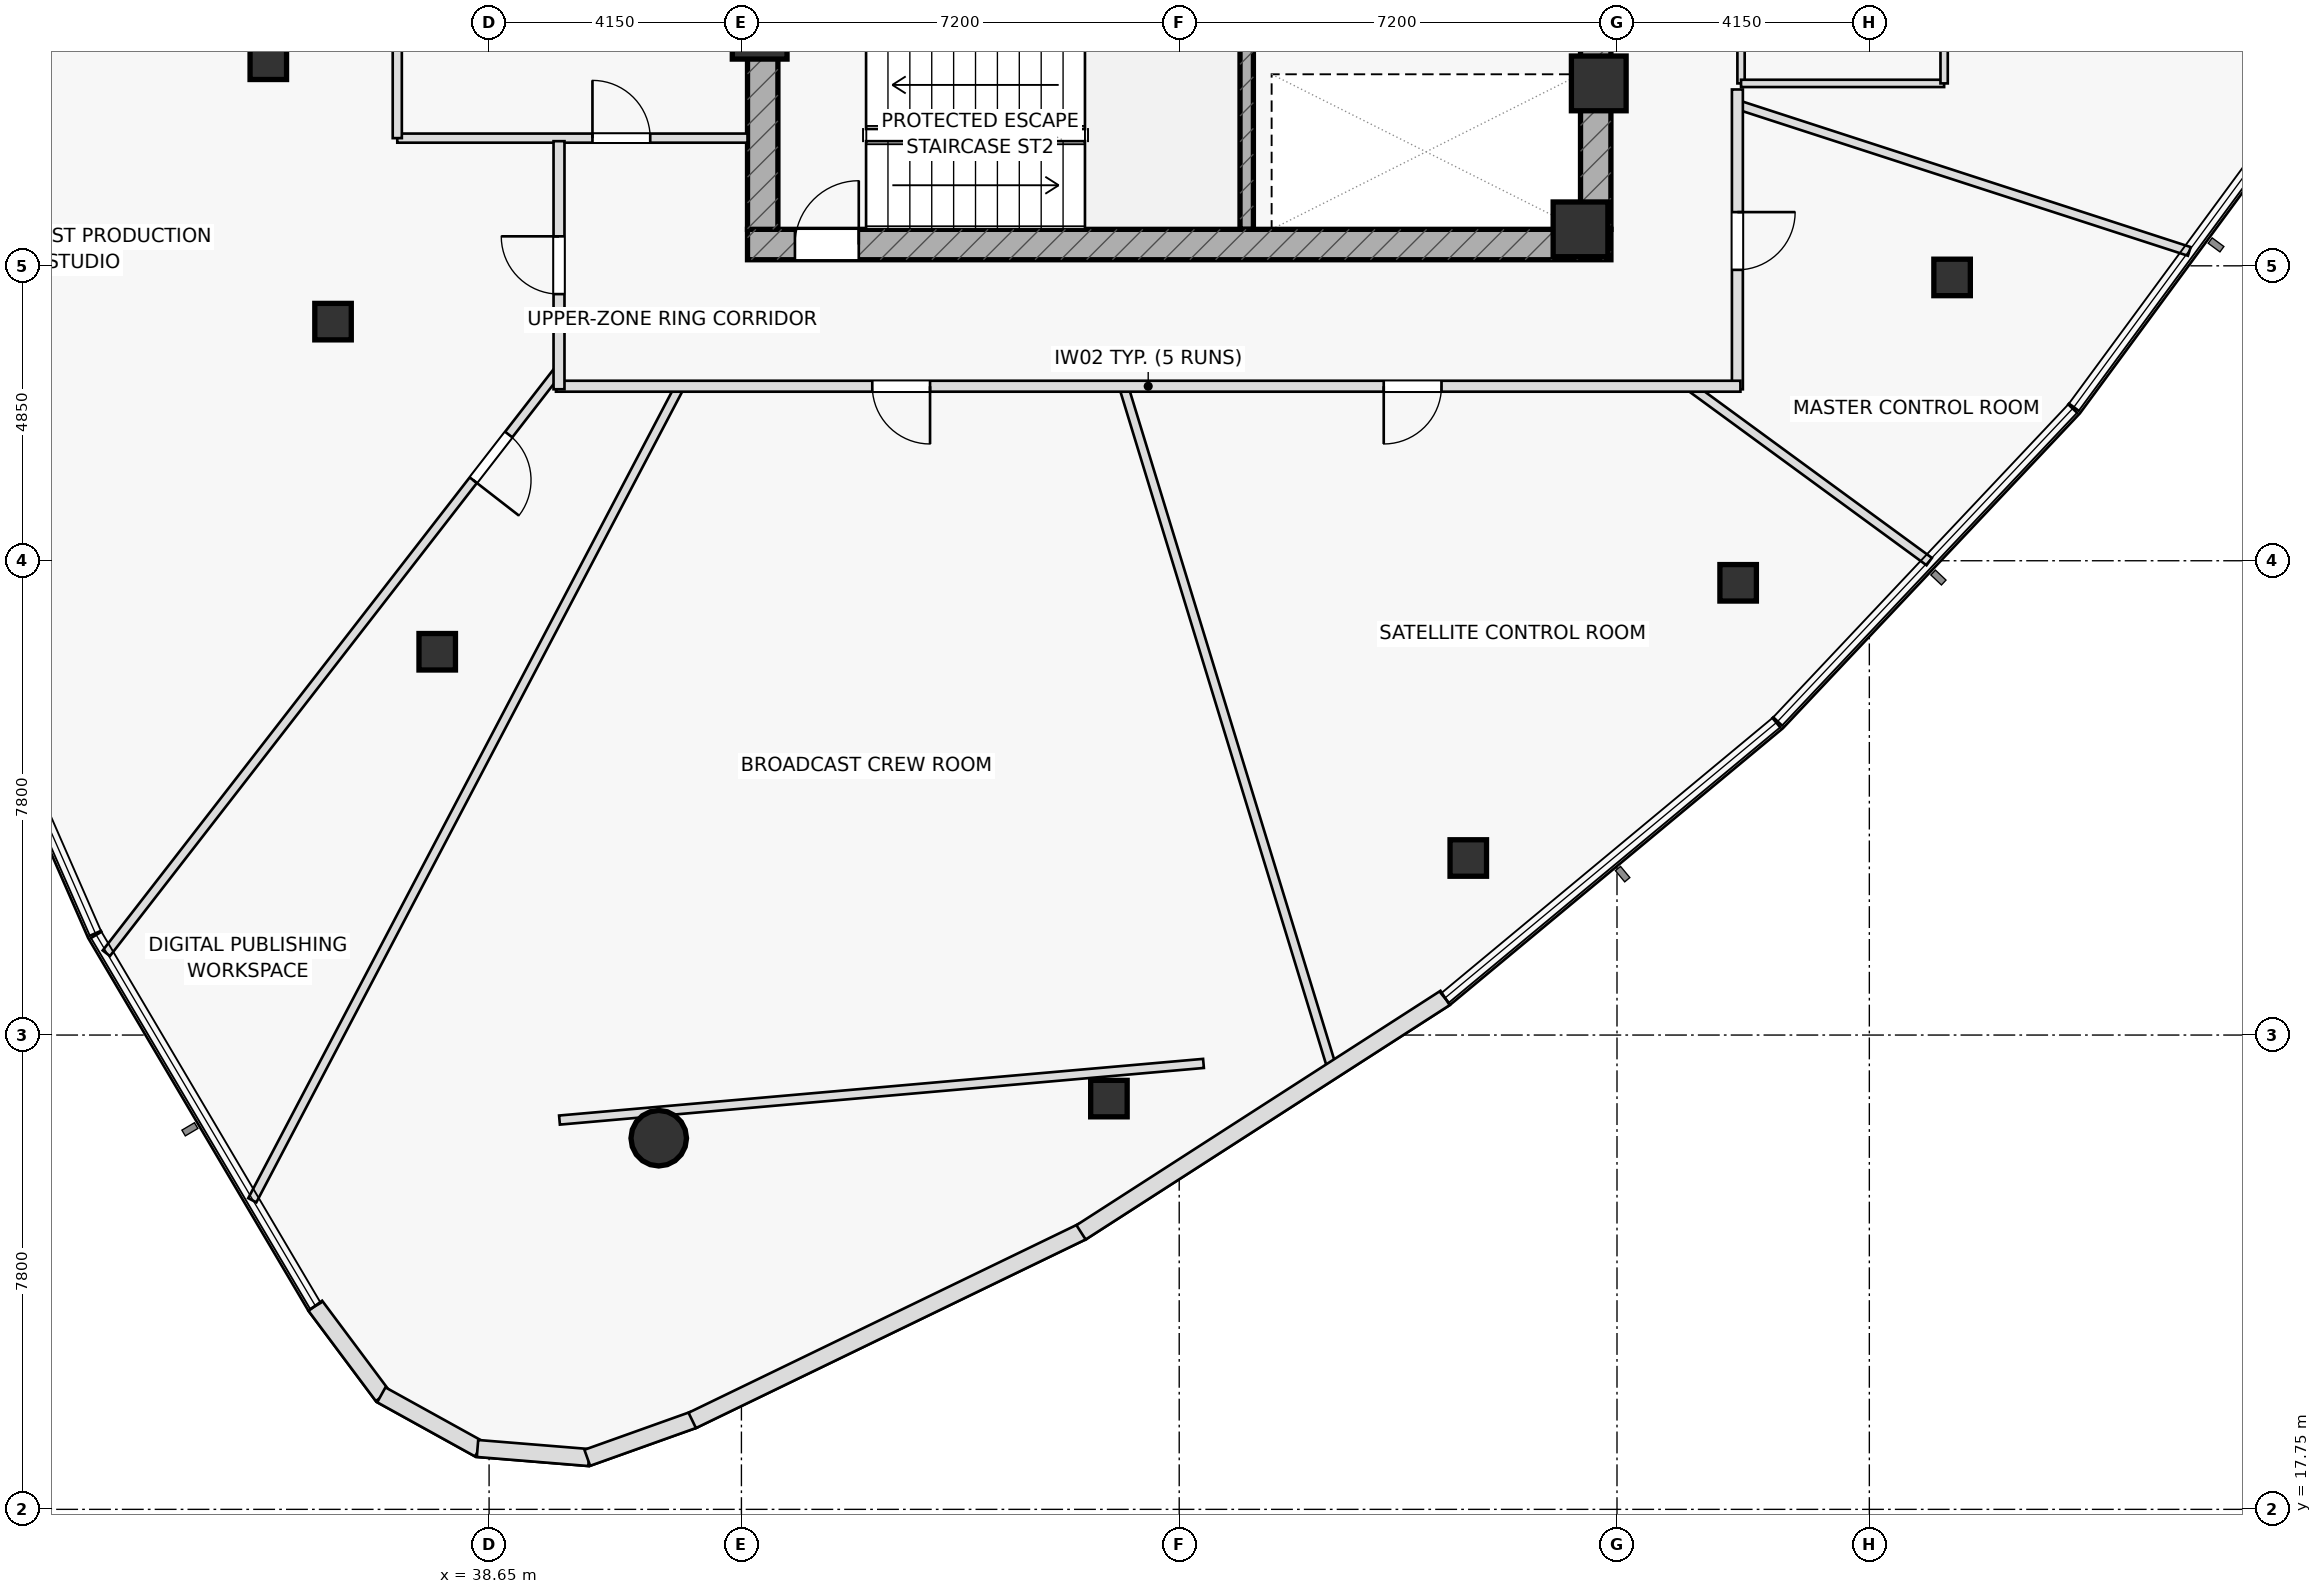
"""IFC4 building model, lengths in metres.
Left out: names, types, materials, properties, quantities, classifications, styles, units other than length and angle.
Written with IfcOpenShell. Run it as: python <this file> out.ifc"""

import sys

from ifc_helpers import new_model, si_unit, direction, frame, frame_2d, origin, origin_2d, place, context, subcontext, project, spatial, rectangle, hollow_rectangle, hollow_circle, extrude, element, fill, save


model = new_model("IFC4")
c1 = context("Model", 3, precision=1e-05, world=origin(), true_north=direction((0.0, 1.0)))
c2 = subcontext(c1, "Body", "Model", "MODEL_VIEW")
j1 = project(units=[si_unit("LENGTHUNIT", "METRE"), si_unit("PLANEANGLEUNIT", "RADIAN")], contexts=[c1])
p1 = place(None, origin())
s1 = spatial("IfcSite", under=j1, at=p1, CompositionType="ELEMENT")
p2 = place(p1, origin())
s2 = spatial("IfcBuilding", under=s1, at=p2, CompositionType="ELEMENT")
p3 = place(p2, frame((0.0, 0.0, 222.15)))
s3 = spatial("IfcBuildingStorey", under=s2, at=p3, CompositionType="ELEMENT", Elevation=222.15)
p4 = place(p3, frame((51.11, 38.8, 0.0), z_axis=(0.0, 0.0, 1.0), x_axis=(0.0, 1.0, 0.0)))
e1 = element("IfcWall", 1, at=p4, inside=s3, PredefinedType="SHEAR", context=c2, shape_type="SweptSolid", body=[
    extrude(rectangle(XDim=3.1, YDim=0.22, at=frame_2d((1.55, 0.0))), origin(), (0.0, 0.0, 1.0), 3.65),
])
p5 = place(p3, frame((42.9, 38.55, 0.0), z_axis=(0.0, 0.0, 1.0), x_axis=(1.0, 0.0, 0.0)))
e2 = element("IfcWall", 2, at=p5, inside=s3, PredefinedType="SHEAR", context=c2, shape_type="SweptSolid", body=[
    extrude(rectangle(XDim=14.2, YDim=0.5, at=frame_2d((7.1, 0.0))), origin(), (0.0, 0.0, 1.0), 3.65),
])
p6 = place(p5, frame((0.78, 0.0, 0.0)))
e3 = element("IfcOpeningElement", 3, at=p6, cuts=e2, PredefinedType="OPENING", context=c2, shape_type="SweptSolid", body=[
    extrude(rectangle(XDim=1.05, YDim=2.2, at=frame_2d((0.525, 1.1))), frame((0.0, 0.26, 0.0), z_axis=(0.0, -1.0, 0.0), x_axis=(1.0, 0.0, 0.0)), (0.0, 0.0, 1.0), 0.52),
])
p7 = place(p3, frame((43.15, 38.8, 0.0), z_axis=(0.0, 0.0, 1.0), x_axis=(0.0, 1.0, 0.0)))
e4 = element("IfcWall", 4, at=p7, inside=s3, PredefinedType="SHEAR", context=c2, shape_type="SweptSolid", body=[
    extrude(rectangle(XDim=12.4, YDim=0.5, at=frame_2d((6.2, 0.0))), origin(), (0.0, 0.0, 1.0), 3.65),
])
p8 = place(p3, frame((56.85, 38.8, 0.0), z_axis=(0.0, 0.0, 1.0), x_axis=(0.0, 1.0, 0.0)))
e5 = element("IfcWall", 5, at=p8, inside=s3, PredefinedType="SHEAR", context=c2, shape_type="SweptSolid", body=[
    extrude(rectangle(XDim=12.4, YDim=0.5, at=frame_2d((6.2, 0.0))), origin(), (0.0, 0.0, 1.0), 3.65),
])
p9 = place(p8, frame((3.85, 0.0, 0.0)))
e6 = element("IfcOpeningElement", 6, at=p9, cuts=e5, PredefinedType="OPENING", context=c2, shape_type="SweptSolid", body=[
    extrude(rectangle(XDim=1.5, YDim=2.2, at=frame_2d((0.75, 1.1))), frame((0.0, 0.26, 0.0), z_axis=(0.0, -1.0, 0.0), x_axis=(1.0, 0.0, 0.0)), (0.0, 0.0, 1.0), 0.52),
])
for number, where, z_axis, x_axis in (
    (7, (43.1, 42.05, 0.0), (0.0, 0.0, 1.0), (1.0, 0.0, 0.0)),
    (8, (56.9, 41.2, 0.0), (0.0, 0.0, 1.0), (1.0, 0.0, 0.0)),
    (9, (56.6, 38.8, 0.0), (0.0, 0.0, 1.0), (1.0, 0.0, 0.0)),
):
    element("IfcColumn", number, at=place(p3, frame(where, z_axis=z_axis, x_axis=x_axis)), inside=s3, PredefinedType="COLUMN", context=c2, shape_type="SweptSolid", body=[
        extrude(rectangle(XDim=0.9, YDim=0.9, at=origin_2d()), origin(), (0.0, 0.0, 1.0), 3.65),
    ])
for number, where, z_axis, x_axis in (
    (10, (35.019, 41.564, 0.0), (0.0, 0.0, 1.0), (1.0, 0.0, 0.0)),
    (11, (36.083, 37.282, 0.0), (0.0, 0.0, 1.0), (1.0, 0.0, 0.0)),
    (12, (37.797, 31.853, 0.0), (0.0, 0.0, 1.0), (1.0, 0.0, 0.0)),
):
    element("IfcColumn", number, at=place(p3, frame(where, z_axis=z_axis, x_axis=x_axis)), inside=s3, PredefinedType="COLUMN", context=c2, shape_type="SweptSolid", body=[
        extrude(hollow_rectangle(XDim=0.6, YDim=0.6, WallThickness=0.036, at=origin_2d()), origin(), (0.0, 0.0, 1.0), 3.65),
    ])
p10 = place(p3, frame((41.44, 23.854, 0.0), z_axis=(0.0, 0.0, 1.0), x_axis=(1.0, 0.0, 0.0)))
e13 = element("IfcColumn", 13, at=p10, inside=s3, PredefinedType="COLUMN", context=c2, shape_type="SweptSolid", body=[
    extrude(hollow_circle(Radius=0.457, WallThickness=0.04, at=origin_2d()), origin(), (0.0, 0.0, 1.0), 3.65),
])
for number, where, z_axis, x_axis in (
    (14, (48.844, 24.505, 0.0), (0.0, 0.0, 1.0), (1.0, 0.0, 0.0)),
    (15, (54.754, 28.462, 0.0), (0.0, 0.0, 1.0), (1.0, 0.0, 0.0)),
    (16, (59.192, 32.987, 0.0), (0.0, 0.0, 1.0), (1.0, 0.0, 0.0)),
    (17, (62.711, 38.009, 0.0), (0.0, 0.0, 1.0), (1.0, 0.0, 0.0)),
):
    element("IfcColumn", number, at=place(p3, frame(where, z_axis=z_axis, x_axis=x_axis)), inside=s3, PredefinedType="COLUMN", context=c2, shape_type="SweptSolid", body=[
        extrude(hollow_rectangle(XDim=0.6, YDim=0.6, WallThickness=0.036, at=origin_2d()), origin(), (0.0, 0.0, 1.0), 3.65),
    ])
p11 = place(p3, frame((39.808, 24.152, 0.0), z_axis=(0.0, 0.0, 1.0), x_axis=(0.996153584085, 0.087624408208, 0.0)))
e18 = element("IfcWall", 18, at=p11, inside=s3, PredefinedType="PARTITIONING", context=c2, shape_type="SweptSolid", body=[
    extrude(rectangle(XDim=10.632, YDim=0.15, at=frame_2d((5.316, 0.0))), origin(), (0.0, 0.0, 1.0), 3.135),
])
p12 = place(p3, frame((37.14, 40.3, 0.0), z_axis=(0.0, 0.0, 1.0), x_axis=(1.0, 0.0, 0.0)))
e19 = element("IfcWall", 19, at=p12, inside=s3, PredefinedType="PARTITIONING", context=c2, shape_type="SweptSolid", body=[
    extrude(rectangle(XDim=5.76, YDim=0.15, at=frame_2d((2.88, 0.0))), origin(), (0.0, 0.0, 1.0), 3.025),
])
p13 = place(p12, frame((3.21, 0.0, 0.0)))
e20 = element("IfcOpeningElement", 20, at=p13, cuts=e19, PredefinedType="OPENING", context=c2, shape_type="SweptSolid", body=[
    extrude(rectangle(XDim=0.95, YDim=2.05, at=frame_2d((0.475, 1.025))), frame((0.0, 0.085, 0.0), z_axis=(0.0, -1.0, 0.0), x_axis=(1.0, 0.0, 0.0)), (0.0, 0.0, 1.0), 0.17),
])
p14 = place(p3, frame((37.14, 40.3, 0.0), z_axis=(0.0, 0.0, 1.0), x_axis=(0.0, 1.0, 0.0)))
e21 = element("IfcWall", 21, at=p14, inside=s3, PredefinedType="PARTITIONING", context=c2, shape_type="SweptSolid", body=[
    extrude(rectangle(XDim=7.58, YDim=0.15, at=frame_2d((3.79, 0.0))), origin(), (0.0, 0.0, 1.0), 3.65),
])
p15 = place(p3, frame((59.24, 41.2, 0.0), z_axis=(0.0, 0.0, 1.0), x_axis=(0.0, 1.0, 0.0)))
e22 = element("IfcWall", 22, at=p15, inside=s3, PredefinedType="PARTITIONING", context=c2, shape_type="SweptSolid", body=[
    extrude(rectangle(XDim=7.0, YDim=0.12, at=frame_2d((3.5, 0.0))), origin(), (0.0, 0.0, 1.0), 3.65),
])
p16 = place(p15, frame((1.15, 0.0, 0.0)))
e23 = element("IfcOpeningElement", 23, at=p16, cuts=e22, PredefinedType="OPENING", context=c2, shape_type="SweptSolid", body=[
    extrude(rectangle(XDim=0.9, YDim=2.05, at=frame_2d((0.45, 1.025))), frame((0.0, 0.07, 0.0), z_axis=(0.0, -1.0, 0.0), x_axis=(1.0, 0.0, 0.0)), (0.0, 0.0, 1.0), 0.14),
])
p17 = place(p15, frame((4.7, 0.0, 0.0)))
e24 = element("IfcOpeningElement", 24, at=p17, cuts=e22, PredefinedType="OPENING", context=c2, shape_type="SweptSolid", body=[
    extrude(rectangle(XDim=0.9, YDim=2.05, at=frame_2d((0.45, 1.025))), frame((0.0, 0.07, 0.0), z_axis=(0.0, -1.0, 0.0), x_axis=(1.0, 0.0, 0.0)), (0.0, 0.0, 1.0), 0.14),
])
p18 = place(p3, frame((59.24, 41.2, 0.0), z_axis=(0.0, 0.0, 1.0), x_axis=(1.0, 0.0, 0.0)))
e25 = element("IfcWall", 25, at=p18, inside=s3, PredefinedType="PARTITIONING", context=c2, shape_type="SweptSolid", body=[
    extrude(rectangle(XDim=3.34, YDim=0.12, at=frame_2d((1.67, 0.0))), origin(), (0.0, 0.0, 1.0), 3.025),
])
p19 = place(p3, frame((62.58, 41.2, 0.0), z_axis=(0.0, 0.0, 1.0), x_axis=(0.0, 1.0, 0.0)))
e26 = element("IfcWall", 26, at=p19, inside=s3, PredefinedType="PARTITIONING", context=c2, shape_type="SweptSolid", body=[
    extrude(rectangle(XDim=7.0, YDim=0.12, at=frame_2d((3.5, 0.0))), origin(), (0.0, 0.0, 1.0), 3.325),
])
p20 = place(p3, frame((49.084, 36.22, 0.0), z_axis=(0.0, 0.0, 1.0), x_axis=(0.292373401992, -0.956304237054, 0.0)))
e27 = element("IfcWall", 27, at=p20, inside=s3, PredefinedType="PARTITIONING", context=c2, shape_type="SweptSolid", body=[
    extrude(rectangle(XDim=11.775, YDim=0.15, at=frame_2d((5.887, 0.0))), origin(), (0.0, 0.0, 1.0), 3.135),
])
p21 = place(p3, frame((58.395, 36.22, 0.0), z_axis=(0.0, 0.0, 1.0), x_axis=(0.806941974178, -0.590630722456, 0.0)))
e28 = element("IfcWall", 28, at=p21, inside=s3, PredefinedType="PARTITIONING", context=c2, shape_type="SweptSolid", body=[
    extrude(rectangle(XDim=4.883, YDim=0.15, at=frame_2d((2.441, 0.0))), origin(), (0.0, 0.0, 1.0), 3.135),
])
p22 = place(p3, frame((59.18, 40.85, 0.0), z_axis=(0.0, 0.0, 1.0), x_axis=(0.951119439097, -0.308823270775, 0.0)))
e29 = element("IfcWall", 29, at=p22, inside=s3, PredefinedType="PARTITIONING", context=c2, shape_type="SweptSolid", body=[
    extrude(rectangle(XDim=7.815, YDim=0.15, at=frame_2d((3.907, 0.0))), origin(), (0.0, 0.0, 1.0), 3.025),
])
p23 = place(p3, frame((39.8, 36.492, 0.0), z_axis=(0.0, 0.0, 1.0), x_axis=(-0.612952103667, -0.790120065946, 0.0)))
e30 = element("IfcWall", 30, at=p23, inside=s3, PredefinedType="PARTITIONING", context=c2, shape_type="SweptSolid", body=[
    extrude(rectangle(XDim=12.146, YDim=0.15, at=frame_2d((6.073, 0.0))), origin(), (0.0, 0.0, 1.0), 3.135),
])
p24 = place(p23, frame((1.35, 0.0, 0.0)))
e31 = element("IfcOpeningElement", 31, at=p24, cuts=e30, PredefinedType="OPENING", context=c2, shape_type="SweptSolid", body=[
    extrude(rectangle(XDim=0.95, YDim=2.05, at=frame_2d((0.475, 1.025))), frame((0.0, 0.085, 0.0), z_axis=(0.0, -1.0, 0.0), x_axis=(1.0, 0.0, 0.0)), (0.0, 0.0, 1.0), 0.17),
])
p25 = place(p3, frame((41.788, 36.22, 0.0), z_axis=(0.0, 0.0, 1.0), x_axis=(-0.465038288732, -0.885290568126, 0.0)))
e32 = element("IfcWall", 32, at=p25, inside=s3, PredefinedType="PARTITIONING", context=c2, shape_type="SweptSolid", body=[
    extrude(rectangle(XDim=15.122, YDim=0.15, at=frame_2d((7.561, 0.0))), origin(), (0.0, 0.0, 1.0), 3.135),
])
p26 = place(p3, frame((59.18, 41.1, 0.0), z_axis=(0.0, 0.0, 1.0), x_axis=(0.0, -1.0, 0.0)))
e33 = element("IfcWall", 33, at=p26, inside=s3, PredefinedType="PARTITIONING", context=c2, shape_type="SweptSolid", body=[
    extrude(rectangle(XDim=4.93, YDim=0.18, at=frame_2d((2.465, 0.0))), origin(), (0.0, 0.0, 1.0), 3.325),
])
p27 = place(p26, frame((2.017, 0.0, 0.0)))
e34 = element("IfcOpeningElement", 34, at=p27, cuts=e33, PredefinedType="OPENING", context=c2, shape_type="SweptSolid", body=[
    extrude(rectangle(XDim=0.95, YDim=2.05, at=frame_2d((0.475, 1.025))), frame((0.0, 0.1, 0.0), z_axis=(0.0, -1.0, 0.0), x_axis=(1.0, 0.0, 0.0)), (0.0, 0.0, 1.0), 0.2),
])
p28 = place(p3, frame((59.23, 36.22, 0.0), z_axis=(0.0, 0.0, 1.0), x_axis=(-1.0, 0.0, 0.0)))
e35 = element("IfcWall", 35, at=p28, inside=s3, PredefinedType="PARTITIONING", context=c2, shape_type="SweptSolid", body=[
    extrude(rectangle(XDim=19.48, YDim=0.18, at=frame_2d((9.74, 0.0))), origin(), (0.0, 0.0, 1.0), 3.025),
])
p29 = place(p28, frame((4.917, 0.0, 0.0)))
e36 = element("IfcOpeningElement", 36, at=p29, cuts=e35, PredefinedType="OPENING", context=c2, shape_type="SweptSolid", body=[
    extrude(rectangle(XDim=0.95, YDim=2.05, at=frame_2d((0.475, 1.025))), frame((0.0, 0.1, 0.0), z_axis=(0.0, -1.0, 0.0), x_axis=(1.0, 0.0, 0.0)), (0.0, 0.0, 1.0), 0.2),
])
p30 = place(p28, frame((13.328, 0.0, 0.0)))
e37 = element("IfcOpeningElement", 37, at=p30, cuts=e35, PredefinedType="OPENING", context=c2, shape_type="SweptSolid", body=[
    extrude(rectangle(XDim=0.95, YDim=2.05, at=frame_2d((0.475, 1.025))), frame((0.0, 0.1, 0.0), z_axis=(0.0, -1.0, 0.0), x_axis=(1.0, 0.0, 0.0)), (0.0, 0.0, 1.0), 0.2),
])
p31 = place(p3, frame((39.8, 36.17, 0.0), z_axis=(0.0, 0.0, 1.0), x_axis=(0.0, 1.0, 0.0)))
e38 = element("IfcWall", 38, at=p31, inside=s3, PredefinedType="PARTITIONING", context=c2, shape_type="SweptSolid", body=[
    extrude(rectangle(XDim=4.08, YDim=0.18, at=frame_2d((2.04, 0.0))), origin(), (0.0, 0.0, 1.0), 3.325),
])
p32 = place(p31, frame((1.565, 0.0, 0.0)))
e39 = element("IfcOpeningElement", 39, at=p32, cuts=e38, PredefinedType="OPENING", context=c2, shape_type="SweptSolid", body=[
    extrude(rectangle(XDim=0.95, YDim=2.05, at=frame_2d((0.475, 1.025))), frame((0.0, 0.1, 0.0), z_axis=(0.0, -1.0, 0.0), x_axis=(1.0, 0.0, 0.0)), (0.0, 0.0, 1.0), 0.2),
])
p33 = place(p3, frame((35.792, 21.098, 0.0), z_axis=(0.0, 0.0, 1.0), x_axis=(0.598332122908, -0.801248195441, 0.0)))
e40 = element("IfcWall", 40, at=p33, inside=s3, PredefinedType="STANDARD", context=c2, shape_type="SweptSolid", body=[
    extrude(rectangle(XDim=1.852, YDim=0.28, at=frame_2d((0.926, 0.0))), origin(), (0.0, 0.0, 1.0), 3.65),
])
for number, where, z_axis, x_axis in (
    (41, (36.878, 19.633, 0.0), (0.0, 0.0, 1.0), (0.875, -0.484, 0.0)),
    (42, (38.46, 18.751, 0.0), (0.0, 0.0, 1.0), (0.997, -0.081, 0.0)),
):
    element("IfcWall", number, at=place(p3, frame(where, z_axis=z_axis, x_axis=x_axis)), inside=s3, PredefinedType="STANDARD", context=c2, shape_type="SweptSolid", body=[
        extrude(rectangle(XDim=1.84, YDim=0.28, at=frame_2d((0.92, 0.0))), origin(), (0.0, 0.0, 1.0), 3.65),
    ])
p34 = place(p3, frame((40.265, 18.598, 0.0), z_axis=(0.0, 0.0, 1.0), x_axis=(0.941744876965, 0.336328093847, 0.0)))
e43 = element("IfcWall", 43, at=p34, inside=s3, PredefinedType="STANDARD", context=c2, shape_type="SweptSolid", body=[
    extrude(rectangle(XDim=1.863, YDim=0.28, at=frame_2d((0.931, 0.0))), origin(), (0.0, 0.0, 1.0), 3.65),
])
p35 = place(p3, frame((41.991, 19.213, 0.0), z_axis=(0.0, 0.0, 1.0), x_axis=(0.900143666149, 0.435593136186, 0.0)))
e44 = element("IfcWall", 44, at=p35, inside=s3, PredefinedType="STANDARD", context=c2, shape_type="SweptSolid", body=[
    extrude(rectangle(XDim=7.133, YDim=0.28, at=frame_2d((3.566, 0.0))), origin(), (0.0, 0.0, 1.0), 3.65),
])
p36 = place(p3, frame((48.385, 22.305, 0.0), z_axis=(0.0, 0.0, 1.0), x_axis=(0.840810674166, 0.541329299234, 0.0)))
e45 = element("IfcWall", 45, at=p36, inside=s3, PredefinedType="STANDARD", context=c2, shape_type="SweptSolid", body=[
    extrude(rectangle(XDim=7.121, YDim=0.28, at=frame_2d((3.561, 0.0))), origin(), (0.0, 0.0, 1.0), 3.65),
])
p37 = place(p6, origin())
e46 = element("IfcDoor", 46, at=p37, inside=s3, OperationType="SINGLE_SWING_RIGHT", PredefinedType="DOOR", context=c2, shape_type="SweptSolid", body=[
    extrude(rectangle(XDim=1.05, YDim=2.2, at=frame_2d((0.525, 1.1))), frame((0.0, 0.025, 0.0), z_axis=(0.0, -1.0, 0.0), x_axis=(1.0, 0.0, 0.0)), (0.0, 0.0, 1.0), 0.05),
])
fill(e3, e46)
p38 = place(p13, origin())
e47 = element("IfcDoor", 47, at=p38, inside=s3, OperationType="SINGLE_SWING_LEFT", PredefinedType="DOOR", context=c2, shape_type="SweptSolid", body=[
    extrude(rectangle(XDim=0.95, YDim=2.05, at=frame_2d((0.475, 1.025))), frame((0.0, 0.025, 0.0), z_axis=(0.0, -1.0, 0.0), x_axis=(1.0, 0.0, 0.0)), (0.0, 0.0, 1.0), 0.05),
])
fill(e20, e47)
p39 = place(p24, origin())
e48 = element("IfcDoor", 48, at=p39, inside=s3, OperationType="SINGLE_SWING_RIGHT", PredefinedType="DOOR", context=c2, shape_type="SweptSolid", body=[
    extrude(rectangle(XDim=0.95, YDim=2.05, at=frame_2d((0.475, 1.025))), frame((0.0, 0.025, 0.0), z_axis=(0.0, -1.0, 0.0), x_axis=(1.0, 0.0, 0.0)), (0.0, 0.0, 1.0), 0.05),
])
fill(e31, e48)
p40 = place(p27, origin())
e49 = element("IfcDoor", 49, at=p40, inside=s3, OperationType="SINGLE_SWING_LEFT", PredefinedType="DOOR", context=c2, shape_type="SweptSolid", body=[
    extrude(rectangle(XDim=0.95, YDim=2.05, at=frame_2d((0.475, 1.025))), frame((0.0, 0.025, 0.0), z_axis=(0.0, -1.0, 0.0), x_axis=(1.0, 0.0, 0.0)), (0.0, 0.0, 1.0), 0.05),
])
fill(e34, e49)
p41 = place(p29, origin())
e50 = element("IfcDoor", 50, at=p41, inside=s3, OperationType="SINGLE_SWING_RIGHT", PredefinedType="DOOR", context=c2, shape_type="SweptSolid", body=[
    extrude(rectangle(XDim=0.95, YDim=2.05, at=frame_2d((0.475, 1.025))), frame((0.0, 0.025, 0.0), z_axis=(0.0, -1.0, 0.0), x_axis=(1.0, 0.0, 0.0)), (0.0, 0.0, 1.0), 0.05),
])
fill(e36, e50)
p42 = place(p30, origin())
e51 = element("IfcDoor", 51, at=p42, inside=s3, OperationType="SINGLE_SWING_LEFT", PredefinedType="DOOR", context=c2, shape_type="SweptSolid", body=[
    extrude(rectangle(XDim=0.95, YDim=2.05, at=frame_2d((0.475, 1.025))), frame((0.0, 0.025, 0.0), z_axis=(0.0, -1.0, 0.0), x_axis=(1.0, 0.0, 0.0)), (0.0, 0.0, 1.0), 0.05),
])
fill(e37, e51)
p43 = place(p32, origin())
e52 = element("IfcDoor", 52, at=p43, inside=s3, OperationType="SINGLE_SWING_RIGHT", PredefinedType="DOOR", context=c2, shape_type="SweptSolid", body=[
    extrude(rectangle(XDim=0.95, YDim=2.05, at=frame_2d((0.475, 1.025))), frame((0.0, 0.025, 0.0), z_axis=(0.0, -1.0, 0.0), x_axis=(1.0, 0.0, 0.0)), (0.0, 0.0, 1.0), 0.05),
])
fill(e39, e52)
save(model, sys.argv[1])
